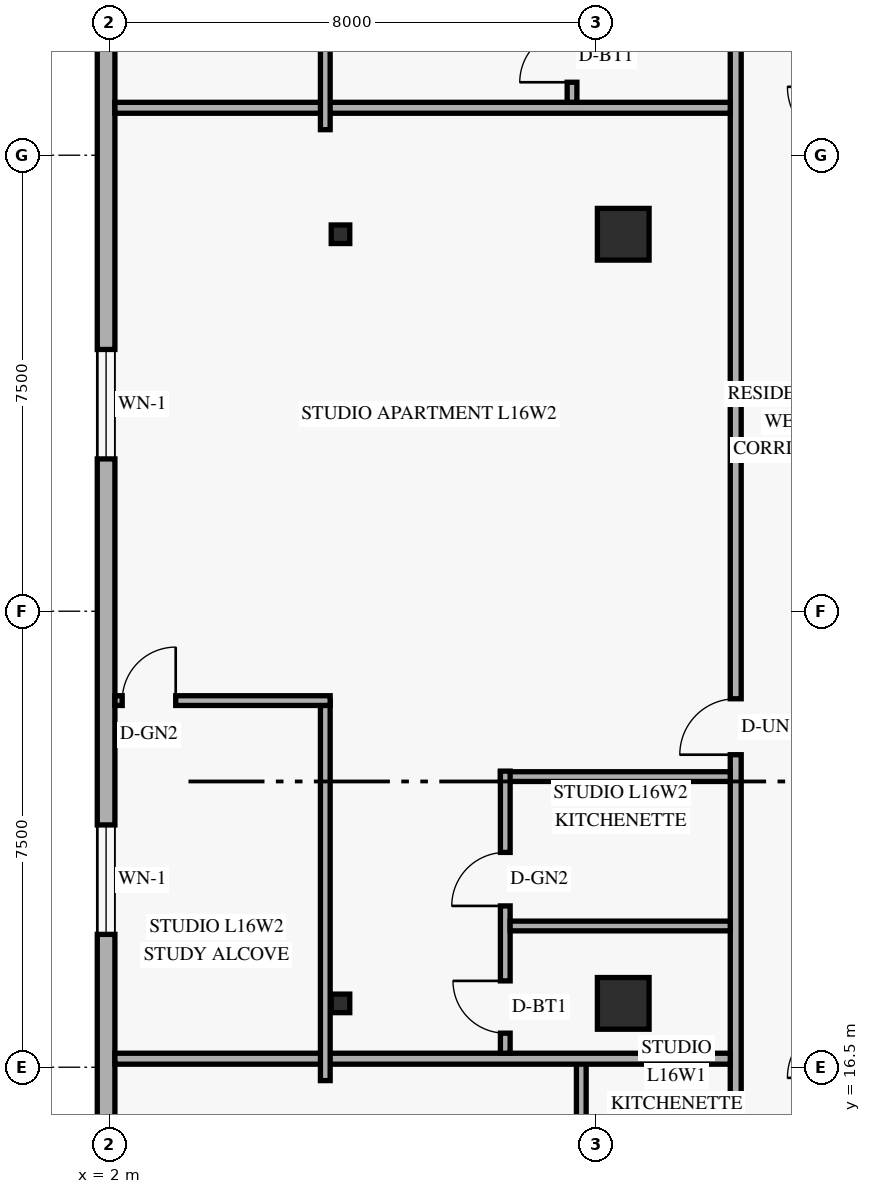
"""IFC4 building model, lengths in metres.
Left out: names, types, materials, properties, quantities, classifications, styles, units other than length and angle.
Written with IfcOpenShell. Run it as: python <this file> out.ifc"""

import sys

from ifc_helpers import new_model, si_unit, direction, frame, frame_2d, origin, origin_2d, place, context, subcontext, project, spatial, rectangle, hollow_rectangle, extrude, element, fill, save


model = new_model("IFC4")
c1 = context("Model", 3, precision=1e-05, world=origin(), true_north=direction((0.0, 1.0)))
c2 = subcontext(c1, "Body", "Model", "MODEL_VIEW")
j1 = project(units=[si_unit("LENGTHUNIT", "METRE"), si_unit("PLANEANGLEUNIT", "RADIAN")], contexts=[c1])
p1 = place(None, origin())
s1 = spatial("IfcSite", under=j1, at=p1, CompositionType="ELEMENT")
p2 = place(p1, origin())
s2 = spatial("IfcBuilding", under=s1, at=p2, CompositionType="ELEMENT")
p3 = place(p2, frame((0.0, 0.0, 64.2)))
s3 = spatial("IfcBuildingStorey", under=s2, at=p3, CompositionType="ELEMENT", Elevation=64.2)
for number, where, z_axis, x_axis in (
    (1, (5.8, 17.55, 0.0), (0.0, 0.0, 1.0), (1.0, 0.0, 0.0)),
    (2, (5.8, 30.2, 0.0), (0.0, 0.0, 1.0), (1.0, 0.0, 0.0)),
):
    element("IfcColumn", number, at=place(p3, frame(where, z_axis=z_axis, x_axis=x_axis)), inside=s3, PredefinedType="COLUMN", context=c2, shape_type="SweptSolid", body=[
        extrude(hollow_rectangle(XDim=0.305, YDim=0.305, WallThickness=0.013, at=origin_2d()), origin(), (0.0, 0.0, 1.0), 3.6),
    ])
for number, where, z_axis, x_axis in (
    (3, (10.45, 17.55, 0.0), (0.0, 0.0, 1.0), (1.0, 0.0, 0.0)),
    (4, (10.45, 30.2, 0.0), (0.0, 0.0, 1.0), (1.0, 0.0, 0.0)),
):
    element("IfcColumn", number, at=place(p3, frame(where, z_axis=z_axis, x_axis=x_axis)), inside=s3, PredefinedType="COLUMN", context=c2, shape_type="SweptSolid", body=[
        extrude(rectangle(XDim=0.85, YDim=0.85, at=origin_2d()), origin(), (0.0, 0.0, 1.0), 3.6),
    ])
p4 = place(p3, frame((1.945, 43.38, 0.0), z_axis=(0.0, 0.0, 1.0), x_axis=(0.0, -1.0, 0.0)))
e5 = element("IfcWall", 5, at=p4, inside=s3, PredefinedType="SOLIDWALL", context=c2, shape_type="SweptSolid", body=[
    extrude(rectangle(XDim=38.76, YDim=0.29, at=frame_2d((19.38, 0.0))), origin(), (0.0, 0.0, 1.0), 3.36),
])
p5 = place(p4, frame((31.85, 0.0, 0.85)))
e6 = element("IfcOpeningElement", 6, at=p5, cuts=e5, PredefinedType="OPENING", context=c2, shape_type="SweptSolid", body=[
    extrude(rectangle(XDim=1.8, YDim=1.6, at=frame_2d((0.9, 0.8))), frame((0.0, 0.155, 0.0), z_axis=(0.0, -1.0, 0.0), x_axis=(1.0, 0.0, 0.0)), (0.0, 0.0, 1.0), 0.31),
])
p6 = place(p4, frame((22.895, 0.0, 0.85)))
e7 = element("IfcOpeningElement", 7, at=p6, cuts=e5, PredefinedType="OPENING", context=c2, shape_type="SweptSolid", body=[
    extrude(rectangle(XDim=1.8, YDim=1.6, at=frame_2d((0.9, 0.8))), frame((0.0, 0.155, 0.0), z_axis=(0.0, -1.0, 0.0), x_axis=(1.0, 0.0, 0.0)), (0.0, 0.0, 1.0), 0.31),
])
p7 = place(p4, frame((15.075, 0.0, 0.85)))
e8 = element("IfcOpeningElement", 8, at=p7, cuts=e5, PredefinedType="OPENING", context=c2, shape_type="SweptSolid", body=[
    extrude(rectangle(XDim=1.8, YDim=1.6, at=frame_2d((0.9, 0.8))), frame((0.0, 0.155, 0.0), z_axis=(0.0, -1.0, 0.0), x_axis=(1.0, 0.0, 0.0)), (0.0, 0.0, 1.0), 0.31),
])
p8 = place(p4, frame((7.255, 0.0, 0.85)))
e9 = element("IfcOpeningElement", 9, at=p8, cuts=e5, PredefinedType="OPENING", context=c2, shape_type="SweptSolid", body=[
    extrude(rectangle(XDim=1.8, YDim=1.6, at=frame_2d((0.9, 0.8))), frame((0.0, 0.155, 0.0), z_axis=(0.0, -1.0, 0.0), x_axis=(1.0, 0.0, 0.0)), (0.0, 0.0, 1.0), 0.31),
])
p9 = place(p4, frame((1.705, 0.0, 0.85)))
e10 = element("IfcOpeningElement", 10, at=p9, cuts=e5, PredefinedType="OPENING", context=c2, shape_type="SweptSolid", body=[
    extrude(rectangle(XDim=1.8, YDim=1.6, at=frame_2d((0.9, 0.8))), frame((0.0, 0.155, 0.0), z_axis=(0.0, -1.0, 0.0), x_axis=(1.0, 0.0, 0.0)), (0.0, 0.0, 1.0), 0.31),
])
p10 = place(p3, frame((12.3, 1.29, 0.0), z_axis=(0.0, 0.0, 1.0), x_axis=(0.0, 1.0, 0.0)))
e11 = element("IfcWall", 11, at=p10, inside=s3, PredefinedType="STANDARD", context=c2, shape_type="SweptSolid", body=[
    extrude(rectangle(XDim=45.42, YDim=0.18, at=frame_2d((22.71, 0.0))), origin(), (0.0, 0.0, 1.0), 2.649),
])
p11 = place(p10, frame((9.41, 0.0, 0.0)))
e12 = element("IfcOpeningElement", 12, at=p11, cuts=e11, PredefinedType="OPENING", context=c2, shape_type="SweptSolid", body=[
    extrude(rectangle(XDim=0.92, YDim=2.15, at=frame_2d((0.46, 1.075))), frame((0.0, 0.1, 0.0), z_axis=(0.0, -1.0, 0.0), x_axis=(1.0, 0.0, 0.0)), (0.0, 0.0, 1.0), 0.2),
])
p12 = place(p10, frame((20.35, 0.0, 0.0)))
e13 = element("IfcOpeningElement", 13, at=p12, cuts=e11, PredefinedType="OPENING", context=c2, shape_type="SweptSolid", body=[
    extrude(rectangle(XDim=0.92, YDim=2.15, at=frame_2d((0.46, 1.075))), frame((0.0, 0.1, 0.0), z_axis=(0.0, -1.0, 0.0), x_axis=(1.0, 0.0, 0.0)), (0.0, 0.0, 1.0), 0.2),
])
p13 = place(p10, frame((35.99, 0.0, 0.0)))
e14 = element("IfcOpeningElement", 14, at=p13, cuts=e11, PredefinedType="OPENING", context=c2, shape_type="SweptSolid", body=[
    extrude(rectangle(XDim=0.92, YDim=2.15, at=frame_2d((0.46, 1.075))), frame((0.0, 0.1, 0.0), z_axis=(0.0, -1.0, 0.0), x_axis=(1.0, 0.0, 0.0)), (0.0, 0.0, 1.0), 0.2),
])
p14 = place(p3, frame((9.76, 11.91, 0.0), z_axis=(0.0, 0.0, 1.0), x_axis=(0.0, 1.0, 0.0)))
e15 = element("IfcWall", 15, at=p14, inside=s3, PredefinedType="PLUMBINGWALL", context=c2, shape_type="SweptSolid", body=[
    extrude(rectangle(XDim=4.73, YDim=0.16, at=frame_2d((2.365, 0.0))), origin(), (0.0, 0.0, 1.0), 2.932),
])
p15 = place(p14, frame((0.42, 0.0, 0.0)))
e16 = element("IfcOpeningElement", 16, at=p15, cuts=e15, PredefinedType="OPENING", context=c2, shape_type="SweptSolid", body=[
    extrude(rectangle(XDim=0.86, YDim=2.12, at=frame_2d((0.43, 1.06))), frame((0.0, 0.09, 0.0), z_axis=(0.0, -1.0, 0.0), x_axis=(1.0, 0.0, 0.0)), (0.0, 0.0, 1.0), 0.18),
])
p16 = place(p14, frame((2.513, 0.0, 0.0)))
e17 = element("IfcOpeningElement", 17, at=p16, cuts=e15, PredefinedType="OPENING", context=c2, shape_type="SweptSolid", body=[
    extrude(rectangle(XDim=0.88, YDim=2.12, at=frame_2d((0.44, 1.06))), frame((0.0, 0.09, 0.0), z_axis=(0.0, -1.0, 0.0), x_axis=(1.0, 0.0, 0.0)), (0.0, 0.0, 1.0), 0.18),
])
p17 = place(p3, frame((2.09, 16.64, 0.0), z_axis=(0.0, 0.0, 1.0), x_axis=(1.0, 0.0, 0.0)))
e18 = element("IfcWall", 18, at=p17, inside=s3, PredefinedType="PARTITIONING", context=c2, shape_type="SweptSolid", body=[
    extrude(rectangle(XDim=10.12, YDim=0.18, at=frame_2d((5.06, 0.0))), origin(), (0.0, 0.0, 1.0), 2.649),
])
p18 = place(p3, frame((8.43, 21.28, 0.0), z_axis=(0.0, 0.0, 1.0), x_axis=(1.0, 0.0, 0.0)))
e19 = element("IfcWall", 19, at=p18, inside=s3, PredefinedType="PLUMBINGWALL", context=c2, shape_type="SweptSolid", body=[
    extrude(rectangle(XDim=3.78, YDim=0.16, at=frame_2d((1.89, 0.0))), origin(), (0.0, 0.0, 1.0), 2.649),
])
p19 = place(p3, frame((8.51, 16.73, 0.0), z_axis=(0.0, 0.0, 1.0), x_axis=(0.0, 1.0, 0.0)))
e20 = element("IfcWall", 20, at=p19, inside=s3, PredefinedType="PLUMBINGWALL", context=c2, shape_type="SweptSolid", body=[
    extrude(rectangle(XDim=4.64, YDim=0.16, at=frame_2d((2.32, 0.0))), origin(), (0.0, 0.0, 1.0), 2.649),
])
p20 = place(p19, frame((0.33, 0.0, 0.0)))
e21 = element("IfcOpeningElement", 21, at=p20, cuts=e20, PredefinedType="OPENING", context=c2, shape_type="SweptSolid", body=[
    extrude(rectangle(XDim=0.86, YDim=2.12, at=frame_2d((0.43, 1.06))), frame((0.0, 0.09, 0.0), z_axis=(0.0, -1.0, 0.0), x_axis=(1.0, 0.0, 0.0)), (0.0, 0.0, 1.0), 0.18),
])
p21 = place(p19, frame((2.423, 0.0, 0.0)))
e22 = element("IfcOpeningElement", 22, at=p21, cuts=e20, PredefinedType="OPENING", context=c2, shape_type="SweptSolid", body=[
    extrude(rectangle(XDim=0.88, YDim=2.12, at=frame_2d((0.44, 1.06))), frame((0.0, 0.09, 0.0), z_axis=(0.0, -1.0, 0.0), x_axis=(1.0, 0.0, 0.0)), (0.0, 0.0, 1.0), 0.18),
])
p22 = place(p3, frame((8.59, 18.823, 0.0), z_axis=(0.0, 0.0, 1.0), x_axis=(1.0, 0.0, 0.0)))
e23 = element("IfcWall", 23, at=p22, inside=s3, PredefinedType="PLUMBINGWALL", context=c2, shape_type="SweptSolid", body=[
    extrude(rectangle(XDim=3.62, YDim=0.16, at=frame_2d((1.81, 0.0))), origin(), (0.0, 0.0, 1.0), 2.649),
])
p23 = place(p3, frame((5.55, 16.28, 0.0), z_axis=(0.0, 0.0, 1.0), x_axis=(0.0, 1.0, 0.0)))
e24 = element("IfcWall", 24, at=p23, inside=s3, PredefinedType="PARTITIONING", context=c2, shape_type="SweptSolid", body=[
    extrude(rectangle(XDim=6.25, YDim=0.16, at=frame_2d((3.125, 0.0))), origin(), (0.0, 0.0, 1.0), 3.36),
])
p24 = place(p3, frame((2.09, 22.53, 0.0), z_axis=(0.0, 0.0, 1.0), x_axis=(1.0, 0.0, 0.0)))
e25 = element("IfcWall", 25, at=p24, inside=s3, PredefinedType="PARTITIONING", context=c2, shape_type="SweptSolid", body=[
    extrude(rectangle(XDim=3.54, YDim=0.16, at=frame_2d((1.77, 0.0))), origin(), (0.0, 0.0, 1.0), 3.36),
])
p25 = place(p24, frame((0.12, 0.0, 0.0)))
e26 = element("IfcOpeningElement", 26, at=p25, cuts=e25, PredefinedType="OPENING", context=c2, shape_type="SweptSolid", body=[
    extrude(rectangle(XDim=0.88, YDim=2.12, at=frame_2d((0.44, 1.06))), frame((0.0, 0.09, 0.0), z_axis=(0.0, -1.0, 0.0), x_axis=(1.0, 0.0, 0.0)), (0.0, 0.0, 1.0), 0.18),
])
p26 = place(p3, frame((2.09, 32.28, 0.0), z_axis=(0.0, 0.0, 1.0), x_axis=(1.0, 0.0, 0.0)))
e27 = element("IfcWall", 27, at=p26, inside=s3, PredefinedType="PARTITIONING", context=c2, shape_type="SweptSolid", body=[
    extrude(rectangle(XDim=10.12, YDim=0.18, at=frame_2d((5.06, 0.0))), origin(), (0.0, 0.0, 1.0), 2.649),
])
p27 = place(p3, frame((9.608, 32.37, 0.0), z_axis=(0.0, 0.0, 1.0), x_axis=(0.0, 1.0, 0.0)))
e28 = element("IfcWall", 28, at=p27, inside=s3, PredefinedType="PLUMBINGWALL", context=c2, shape_type="SweptSolid", body=[
    extrude(rectangle(XDim=4.64, YDim=0.16, at=frame_2d((2.32, 0.0))), origin(), (0.0, 0.0, 1.0), 2.932),
])
p28 = place(p27, frame((0.33, 0.0, 0.0)))
e29 = element("IfcOpeningElement", 29, at=p28, cuts=e28, PredefinedType="OPENING", context=c2, shape_type="SweptSolid", body=[
    extrude(rectangle(XDim=0.86, YDim=2.12, at=frame_2d((0.43, 1.06))), frame((0.0, 0.09, 0.0), z_axis=(0.0, -1.0, 0.0), x_axis=(1.0, 0.0, 0.0)), (0.0, 0.0, 1.0), 0.18),
])
p29 = place(p27, frame((2.423, 0.0, 0.0)))
e30 = element("IfcOpeningElement", 30, at=p29, cuts=e28, PredefinedType="OPENING", context=c2, shape_type="SweptSolid", body=[
    extrude(rectangle(XDim=0.88, YDim=2.12, at=frame_2d((0.44, 1.06))), frame((0.0, 0.09, 0.0), z_axis=(0.0, -1.0, 0.0), x_axis=(1.0, 0.0, 0.0)), (0.0, 0.0, 1.0), 0.18),
])
p30 = place(p3, frame((5.55, 31.92, 0.0), z_axis=(0.0, 0.0, 1.0), x_axis=(0.0, 1.0, 0.0)))
e31 = element("IfcWall", 31, at=p30, inside=s3, PredefinedType="PARTITIONING", context=c2, shape_type="SweptSolid", body=[
    extrude(rectangle(XDim=6.25, YDim=0.16, at=frame_2d((3.125, 0.0))), origin(), (0.0, 0.0, 1.0), 3.36),
])
p31 = place(p6, origin())
e32 = element("IfcWindow", 32, at=p31, inside=s3, PartitioningType="SINGLE_PANEL", PredefinedType="WINDOW", context=c2, shape_type="SweptSolid", body=[
    extrude(rectangle(XDim=1.8, YDim=1.6, at=frame_2d((0.9, 0.8))), frame((0.0, 0.03, 0.0), z_axis=(0.0, -1.0, 0.0), x_axis=(1.0, 0.0, 0.0)), (0.0, 0.0, 1.0), 0.06),
])
fill(e7, e32)
p32 = place(p7, origin())
e33 = element("IfcWindow", 33, at=p32, inside=s3, PartitioningType="SINGLE_PANEL", PredefinedType="WINDOW", context=c2, shape_type="SweptSolid", body=[
    extrude(rectangle(XDim=1.8, YDim=1.6, at=frame_2d((0.9, 0.8))), frame((0.0, 0.03, 0.0), z_axis=(0.0, -1.0, 0.0), x_axis=(1.0, 0.0, 0.0)), (0.0, 0.0, 1.0), 0.06),
])
fill(e8, e33)
p33 = place(p25, origin())
e34 = element("IfcDoor", 34, at=p33, inside=s3, OperationType="SINGLE_SWING_RIGHT", PredefinedType="DOOR", context=c2, shape_type="SweptSolid", body=[
    extrude(rectangle(XDim=0.88, YDim=2.12, at=frame_2d((0.44, 1.06))), frame((0.0, 0.025, 0.0), z_axis=(0.0, -1.0, 0.0), x_axis=(1.0, 0.0, 0.0)), (0.0, 0.0, 1.0), 0.05),
])
fill(e26, e34)
p34 = place(p12, origin())
e35 = element("IfcDoor", 35, at=p34, inside=s3, OperationType="SINGLE_SWING_LEFT", PredefinedType="DOOR", context=c2, shape_type="SweptSolid", body=[
    extrude(rectangle(XDim=0.92, YDim=2.15, at=frame_2d((0.46, 1.075))), frame((0.0, 0.025, 0.0), z_axis=(0.0, -1.0, 0.0), x_axis=(1.0, 0.0, 0.0)), (0.0, 0.0, 1.0), 0.05),
])
fill(e13, e35)
p35 = place(p20, origin())
e36 = element("IfcDoor", 36, at=p35, inside=s3, OperationType="SINGLE_SWING_RIGHT", PredefinedType="DOOR", context=c2, shape_type="SweptSolid", body=[
    extrude(rectangle(XDim=0.86, YDim=2.12, at=frame_2d((0.43, 1.06))), frame((0.0, 0.025, 0.0), z_axis=(0.0, -1.0, 0.0), x_axis=(1.0, 0.0, 0.0)), (0.0, 0.0, 1.0), 0.05),
])
fill(e21, e36)
p36 = place(p21, origin())
e37 = element("IfcDoor", 37, at=p36, inside=s3, OperationType="SINGLE_SWING_LEFT", PredefinedType="DOOR", context=c2, shape_type="SweptSolid", body=[
    extrude(rectangle(XDim=0.88, YDim=2.12, at=frame_2d((0.44, 1.06))), frame((0.0, 0.025, 0.0), z_axis=(0.0, -1.0, 0.0), x_axis=(1.0, 0.0, 0.0)), (0.0, 0.0, 1.0), 0.05),
])
fill(e22, e37)
p37 = place(p28, origin())
e38 = element("IfcDoor", 38, at=p37, inside=s3, OperationType="SINGLE_SWING_LEFT", PredefinedType="DOOR", context=c2, shape_type="SweptSolid", body=[
    extrude(rectangle(XDim=0.86, YDim=2.12, at=frame_2d((0.43, 1.06))), frame((0.0, 0.025, 0.0), z_axis=(0.0, -1.0, 0.0), x_axis=(1.0, 0.0, 0.0)), (0.0, 0.0, 1.0), 0.05),
])
fill(e29, e38)
save(model, sys.argv[1])
